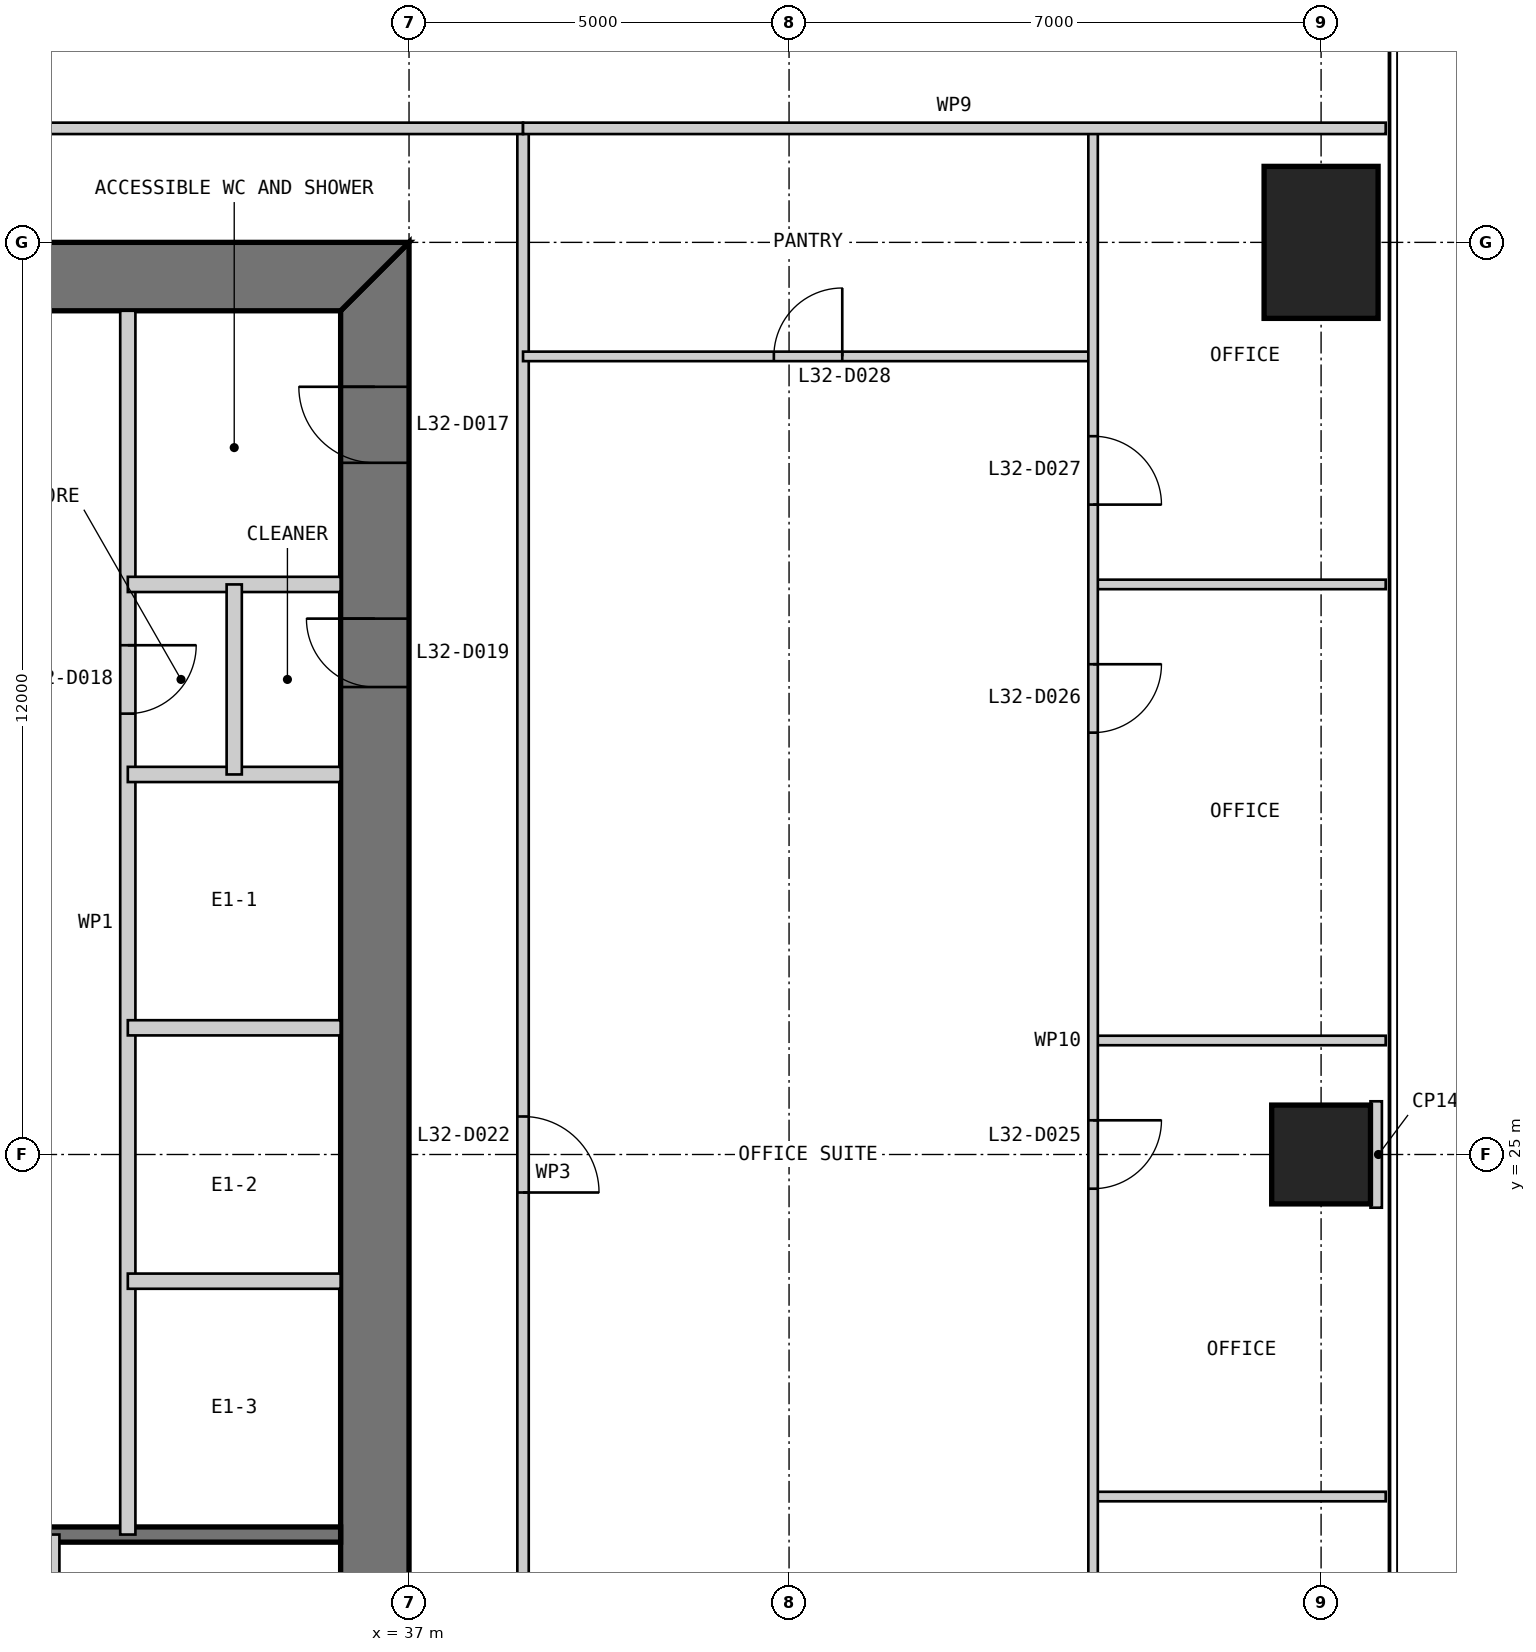
"""IFC4 building model, lengths in metres.
Left out: names, types, materials, properties, quantities, classifications, styles, units other than length and angle.
Written with IfcOpenShell. Run it as: python <this file> out.ifc"""

import sys

from ifc_helpers import new_model, si_unit, direction, frame, frame_2d, origin, origin_2d, place, context, subcontext, project, spatial, polyline, rectangle, outline, extrude, element, fill, save


model = new_model("IFC4")
c1 = context("Model", 3, precision=1e-05, world=origin(), true_north=direction((0.0, 1.0)))
c2 = subcontext(c1, "Body", "Model", "MODEL_VIEW")
j1 = project(units=[si_unit("LENGTHUNIT", "METRE"), si_unit("PLANEANGLEUNIT", "RADIAN")], contexts=[c1])
p1 = place(None, origin())
s1 = spatial("IfcSite", under=j1, at=p1, CompositionType="ELEMENT")
p2 = place(p1, origin())
s2 = spatial("IfcBuilding", under=s1, at=p2, CompositionType="ELEMENT")
p3 = place(p2, frame((0.0, 0.0, 138.4)))
s3 = spatial("IfcBuildingStorey", under=s2, at=p3, CompositionType="ELEMENT", Elevation=138.4)
p4 = place(p3, frame((49.0, 25.0, 0.0), z_axis=(0.0, 0.0, 1.0), x_axis=(1.0, 0.0, 0.0)))
e1 = element("IfcColumn", 1, at=p4, inside=s3, PredefinedType="COLUMN", context=c2, shape_type="SweptSolid", body=[
    extrude(rectangle(XDim=1.3, YDim=1.3, at=origin_2d()), origin(), (0.0, 0.0, 1.0), 4.0),
])
p5 = place(p3, frame((49.0, 37.0, 0.0), z_axis=(0.0, 0.0, 1.0), x_axis=(1.0, 0.0, 0.0)))
e2 = element("IfcColumn", 2, at=p5, inside=s3, PredefinedType="COLUMN", context=c2, shape_type="SweptSolid", body=[
    extrude(rectangle(XDim=1.5, YDim=2.0, at=origin_2d()), origin(), (0.0, 0.0, 1.0), 4.0),
])
p6 = place(p3, frame((36.55, 13.9, 0.0), z_axis=(0.0, 0.0, 1.0), x_axis=(0.0, 1.0, 0.0)))
e3 = element("IfcWall", 3, at=p6, inside=s3, PredefinedType="SHEAR", context=c2, shape_type="SweptSolid", body=[
    extrude(outline(polyline([(-0.9, -0.45), (23.1, -0.45), (22.2, 0.45), (0.0, 0.45), (-0.9, -0.45)])), origin(), (0.0, 0.0, 1.0), 4.0),
])
p7 = place(p6, frame((20.2, 0.0, 0.0)))
e4 = element("IfcOpeningElement", 4, at=p7, cuts=e3, PredefinedType="OPENING", context=c2, shape_type="SweptSolid", body=[
    extrude(rectangle(XDim=1.0, YDim=2.2, at=frame_2d((0.5, 1.1))), frame((0.0, 0.46, 0.0), z_axis=(0.0, -1.0, 0.0), x_axis=(1.0, 0.0, 0.0)), (0.0, 0.0, 1.0), 0.92),
])
p8 = place(p6, frame((17.25, 0.0, 0.0)))
e5 = element("IfcOpeningElement", 5, at=p8, cuts=e3, PredefinedType="OPENING", context=c2, shape_type="SweptSolid", body=[
    extrude(rectangle(XDim=0.9, YDim=2.2, at=frame_2d((0.45, 1.1))), frame((0.0, 0.46, 0.0), z_axis=(0.0, -1.0, 0.0), x_axis=(1.0, 0.0, 0.0)), (0.0, 0.0, 1.0), 0.92),
])
p9 = place(p3, frame((37.0, 36.55, 0.0), z_axis=(0.0, 0.0, 1.0), x_axis=(-1.0, 0.0, 0.0)))
e6 = element("IfcWall", 6, at=p9, inside=s3, PredefinedType="SHEAR", context=c2, shape_type="SweptSolid", body=[
    extrude(outline(polyline([(0.0, -0.45), (24.0, -0.45), (23.1, 0.45), (0.9, 0.45), (0.0, -0.45)])), origin(), (0.0, 0.0, 1.0), 4.0),
])
p10 = place(p9, frame((4.9, 0.0, 0.0)))
e7 = element("IfcOpeningElement", 7, at=p10, cuts=e6, PredefinedType="OPENING", context=c2, shape_type="SweptSolid", body=[
    extrude(rectangle(XDim=1.0, YDim=2.2, at=frame_2d((0.5, 1.1))), frame((0.0, 0.46, 0.0), z_axis=(0.0, -1.0, 0.0), x_axis=(1.0, 0.0, 0.0)), (0.0, 0.0, 1.0), 0.92),
])
p11 = place(p9, frame((8.9, 0.0, 0.0)))
e8 = element("IfcOpeningElement", 8, at=p11, cuts=e6, PredefinedType="OPENING", context=c2, shape_type="SweptSolid", body=[
    extrude(rectangle(XDim=1.1, YDim=2.2, at=frame_2d((0.55, 1.1))), frame((0.0, 0.46, 0.0), z_axis=(0.0, -1.0, 0.0), x_axis=(1.0, 0.0, 0.0)), (0.0, 0.0, 1.0), 0.92),
])
p12 = place(p9, frame((15.05, 0.0, 0.0)))
e9 = element("IfcOpeningElement", 9, at=p12, cuts=e6, PredefinedType="OPENING", context=c2, shape_type="SweptSolid", body=[
    extrude(rectangle(XDim=0.9, YDim=2.2, at=frame_2d((0.45, 1.1))), frame((0.0, 0.46, 0.0), z_axis=(0.0, -1.0, 0.0), x_axis=(1.0, 0.0, 0.0)), (0.0, 0.0, 1.0), 0.92),
])
p13 = place(p9, frame((17.9, 0.0, 0.0)))
e10 = element("IfcOpeningElement", 10, at=p13, cuts=e6, PredefinedType="OPENING", context=c2, shape_type="SweptSolid", body=[
    extrude(rectangle(XDim=1.0, YDim=2.2, at=frame_2d((0.5, 1.1))), frame((0.0, 0.46, 0.0), z_axis=(0.0, -1.0, 0.0), x_axis=(1.0, 0.0, 0.0)), (0.0, 0.0, 1.0), 0.92),
])
p14 = place(p9, frame((21.4, 0.0, 0.0)))
e11 = element("IfcOpeningElement", 11, at=p14, cuts=e6, PredefinedType="OPENING", context=c2, shape_type="SweptSolid", body=[
    extrude(rectangle(XDim=1.0, YDim=2.2, at=frame_2d((0.5, 1.1))), frame((0.0, 0.46, 0.0), z_axis=(0.0, -1.0, 0.0), x_axis=(1.0, 0.0, 0.0)), (0.0, 0.0, 1.0), 0.92),
])
p15 = place(p3, frame((20.3, 20.0, 0.0), z_axis=(0.0, 0.0, 1.0), x_axis=(1.0, 0.0, 0.0)))
e12 = element("IfcWall", 12, at=p15, inside=s3, PredefinedType="SOLIDWALL", context=c2, shape_type="SweptSolid", body=[
    extrude(rectangle(XDim=15.8, YDim=0.2, at=frame_2d((7.9, 0.0))), origin(), (0.0, 0.0, 1.0), 3.8),
])
p16 = place(p3, frame((32.3, 13.9, 0.0), z_axis=(0.0, 0.0, 1.0), x_axis=(0.0, 1.0, 0.0)))
e13 = element("IfcWall", 13, at=p16, inside=s3, PredefinedType="PARTITIONING", context=c2, shape_type="SweptSolid", body=[
    extrude(rectangle(XDim=6.1, YDim=0.2, at=frame_2d((3.05, 0.0))), origin(), (0.0, 0.0, 1.0), 3.8),
])
p17 = place(p3, frame((33.3, 36.1, 0.0), z_axis=(0.0, 0.0, 1.0), x_axis=(0.0, -1.0, 0.0)))
e14 = element("IfcWall", 14, at=p17, inside=s3, PredefinedType="PARTITIONING", context=c2, shape_type="SweptSolid", body=[
    extrude(rectangle(XDim=16.1, YDim=0.2, at=frame_2d((8.05, 0.0))), origin(), (0.0, 0.0, 1.0), 3.8),
])
p18 = place(p17, frame((4.4, 0.0, 0.0)))
e15 = element("IfcOpeningElement", 15, at=p18, cuts=e14, PredefinedType="OPENING", context=c2, shape_type="SweptSolid", body=[
    extrude(rectangle(XDim=0.9, YDim=2.2, at=frame_2d((0.45, 1.1))), frame((0.0, 0.11, 0.0), z_axis=(0.0, -1.0, 0.0), x_axis=(1.0, 0.0, 0.0)), (0.0, 0.0, 1.0), 0.22),
])
for number, where, z_axis, x_axis in (
    (16, (36.1, 30.0, 0.0), (0.0, 0.0, 1.0), (-1.0, 0.0, 0.0)),
    (17, (36.1, 26.667, 0.0), (0.0, 0.0, 1.0), (-1.0, 0.0, 0.0)),
    (18, (36.1, 23.333, 0.0), (0.0, 0.0, 1.0), (-1.0, 0.0, 0.0)),
    (19, (36.1, 32.5, 0.0), (0.0, 0.0, 1.0), (-1.0, 0.0, 0.0)),
):
    element("IfcWall", number, at=place(p3, frame(where, z_axis=z_axis, x_axis=x_axis)), inside=s3, PredefinedType="PARTITIONING", context=c2, shape_type="SweptSolid", body=[
        extrude(rectangle(XDim=2.8, YDim=0.2, at=frame_2d((1.4, 0.0))), origin(), (0.0, 0.0, 1.0), 3.8),
    ])
p19 = place(p3, frame((34.7, 32.5, 0.0), z_axis=(0.0, 0.0, 1.0), x_axis=(0.0, -1.0, 0.0)))
e20 = element("IfcWall", 20, at=p19, inside=s3, PredefinedType="PARTITIONING", context=c2, shape_type="SweptSolid", body=[
    extrude(rectangle(XDim=2.5, YDim=0.2, at=frame_2d((1.25, 0.0))), origin(), (0.0, 0.0, 1.0), 3.8),
])
p20 = place(p3, frame((38.5, 11.5, 0.0), z_axis=(0.0, 0.0, 1.0), x_axis=(0.0, 1.0, 0.0)))
e21 = element("IfcWall", 21, at=p20, inside=s3, PredefinedType="PARTITIONING", context=c2, shape_type="SweptSolid", body=[
    extrude(rectangle(XDim=27.0, YDim=0.15, at=frame_2d((13.5, 0.0))), origin(), (0.0, 0.0, 1.0), 3.85),
])
p21 = place(p20, frame((13.0, 0.0, 0.0)))
e22 = element("IfcOpeningElement", 22, at=p21, cuts=e21, PredefinedType="OPENING", context=c2, shape_type="SweptSolid", body=[
    extrude(rectangle(XDim=1.0, YDim=2.2, at=frame_2d((0.5, 1.1))), frame((0.0, 0.085, 0.0), z_axis=(0.0, -1.0, 0.0), x_axis=(1.0, 0.0, 0.0)), (0.0, 0.0, 1.0), 0.17),
])
for number, where, z_axis, x_axis in (
    (23, (49.85, 20.5, 0.0), (0.0, 0.0, 1.0), (-1.0, 0.0, 0.0)),
    (24, (49.85, 26.5, 0.0), (0.0, 0.0, 1.0), (-1.0, 0.0, 0.0)),
    (25, (49.85, 32.5, 0.0), (0.0, 0.0, 1.0), (-1.0, 0.0, 0.0)),
):
    element("IfcWall", number, at=place(p3, frame(where, z_axis=z_axis, x_axis=x_axis)), inside=s3, PredefinedType="PARTITIONING", context=c2, shape_type="SweptSolid", body=[
        extrude(rectangle(XDim=3.85, YDim=0.125, at=frame_2d((1.925, 0.0))), origin(), (0.0, 0.0, 1.0), 3.85),
    ])
p22 = place(p3, frame((46.0, 35.5, 0.0), z_axis=(0.0, 0.0, 1.0), x_axis=(-1.0, 0.0, 0.0)))
e26 = element("IfcWall", 26, at=p22, inside=s3, PredefinedType="PARTITIONING", context=c2, shape_type="SweptSolid", body=[
    extrude(rectangle(XDim=7.5, YDim=0.125, at=frame_2d((3.75, 0.0))), origin(), (0.0, 0.0, 1.0), 3.85),
])
p23 = place(p22, frame((3.3, 0.0, 0.0)))
e27 = element("IfcOpeningElement", 27, at=p23, cuts=e26, PredefinedType="OPENING", context=c2, shape_type="SweptSolid", body=[
    extrude(rectangle(XDim=0.9, YDim=2.2, at=frame_2d((0.45, 1.1))), frame((0.0, 0.073, 0.0), z_axis=(0.0, -1.0, 0.0), x_axis=(1.0, 0.0, 0.0)), (0.0, 0.0, 1.0), 0.145),
])
p24 = place(p3, frame((46.0, 14.5, 0.0), z_axis=(0.0, 0.0, 1.0), x_axis=(0.0, 1.0, 0.0)))
e28 = element("IfcWall", 28, at=p24, inside=s3, PredefinedType="PARTITIONING", context=c2, shape_type="SweptSolid", body=[
    extrude(rectangle(XDim=24.0, YDim=0.125, at=frame_2d((12.0, 0.0))), origin(), (0.0, 0.0, 1.0), 3.238),
])
p25 = place(p24, frame((4.05, 0.0, 0.0)))
e29 = element("IfcOpeningElement", 29, at=p25, cuts=e28, PredefinedType="OPENING", context=c2, shape_type="SweptSolid", body=[
    extrude(rectangle(XDim=0.9, YDim=2.2, at=frame_2d((0.45, 1.1))), frame((0.0, 0.073, 0.0), z_axis=(0.0, -1.0, 0.0), x_axis=(1.0, 0.0, 0.0)), (0.0, 0.0, 1.0), 0.145),
])
p26 = place(p24, frame((10.05, 0.0, 0.0)))
e30 = element("IfcOpeningElement", 30, at=p26, cuts=e28, PredefinedType="OPENING", context=c2, shape_type="SweptSolid", body=[
    extrude(rectangle(XDim=0.9, YDim=2.2, at=frame_2d((0.45, 1.1))), frame((0.0, 0.073, 0.0), z_axis=(0.0, -1.0, 0.0), x_axis=(1.0, 0.0, 0.0)), (0.0, 0.0, 1.0), 0.145),
])
p27 = place(p24, frame((16.05, 0.0, 0.0)))
e31 = element("IfcOpeningElement", 31, at=p27, cuts=e28, PredefinedType="OPENING", context=c2, shape_type="SweptSolid", body=[
    extrude(rectangle(XDim=0.9, YDim=2.2, at=frame_2d((0.45, 1.1))), frame((0.0, 0.073, 0.0), z_axis=(0.0, -1.0, 0.0), x_axis=(1.0, 0.0, 0.0)), (0.0, 0.0, 1.0), 0.145),
])
p28 = place(p24, frame((19.05, 0.0, 0.0)))
e32 = element("IfcOpeningElement", 32, at=p28, cuts=e28, PredefinedType="OPENING", context=c2, shape_type="SweptSolid", body=[
    extrude(rectangle(XDim=0.9, YDim=2.2, at=frame_2d((0.45, 1.1))), frame((0.0, 0.073, 0.0), z_axis=(0.0, -1.0, 0.0), x_axis=(1.0, 0.0, 0.0)), (0.0, 0.0, 1.0), 0.145),
])
p29 = place(p3, frame((38.5, 38.5, 0.0), z_axis=(0.0, 0.0, 1.0), x_axis=(-1.0, 0.0, 0.0)))
e33 = element("IfcWall", 33, at=p29, inside=s3, PredefinedType="PARTITIONING", context=c2, shape_type="SweptSolid", body=[
    extrude(rectangle(XDim=27.0, YDim=0.15, at=frame_2d((13.5, 0.0))), origin(), (0.0, 0.0, 1.0), 3.85),
])
p30 = place(p29, frame((11.5, 0.0, 0.0)))
e34 = element("IfcOpeningElement", 34, at=p30, cuts=e33, PredefinedType="OPENING", context=c2, shape_type="SweptSolid", body=[
    extrude(rectangle(XDim=1.0, YDim=2.2, at=frame_2d((0.5, 1.1))), frame((0.0, 0.085, 0.0), z_axis=(0.0, -1.0, 0.0), x_axis=(1.0, 0.0, 0.0)), (0.0, 0.0, 1.0), 0.17),
])
p31 = place(p3, frame((49.85, 38.5, 0.0), z_axis=(0.0, 0.0, 1.0), x_axis=(-1.0, 0.0, 0.0)))
e35 = element("IfcWall", 35, at=p31, inside=s3, PredefinedType="PARTITIONING", context=c2, shape_type="SweptSolid", body=[
    extrude(rectangle(XDim=11.35, YDim=0.15, at=frame_2d((5.675, 0.0))), origin(), (0.0, 0.0, 1.0), 3.85),
])
p32 = place(p3, frame((49.8, 25.0, 0.0), z_axis=(0.0, 0.0, 1.0), x_axis=(-1.0, 0.0, 0.0)))
e36 = element("IfcWall", 36, at=p32, inside=s3, PredefinedType="PARTITIONING", context=c2, shape_type="SweptSolid", body=[
    extrude(rectangle(XDim=0.15, YDim=1.4, at=frame_2d((0.075, 0.0))), origin(), (0.0, 0.0, 1.0), 3.85),
])
p33 = place(p7, origin())
e37 = element("IfcDoor", 37, at=p33, inside=s3, OperationType="SINGLE_SWING_RIGHT", PredefinedType="DOOR", context=c2, shape_type="SweptSolid", body=[
    extrude(rectangle(XDim=1.0, YDim=2.2, at=frame_2d((0.5, 1.1))), frame((0.0, 0.025, 0.0), z_axis=(0.0, -1.0, 0.0), x_axis=(1.0, 0.0, 0.0)), (0.0, 0.0, 1.0), 0.05),
    extrude(outline(polyline([(0.0, 0.0), (0.04, 0.0), (0.04, 2.16), (0.96, 2.16), (0.96, 0.0), (1.0, 0.0), (1.0, 2.2), (0.0, 2.2), (0.0, 0.0)])), frame((0.0, 0.3, 0.0), z_axis=(0.0, -1.0, 0.0), x_axis=(1.0, 0.0, 0.0)), (0.0, 0.0, 1.0), 0.6),
])
fill(e4, e37)
p34 = place(p18, origin())
e38 = element("IfcDoor", 38, at=p34, inside=s3, OperationType="SINGLE_SWING_LEFT", PredefinedType="DOOR", context=c2, shape_type="SweptSolid", body=[
    extrude(rectangle(XDim=0.9, YDim=2.2, at=frame_2d((0.45, 1.1))), frame((0.0, 0.025, 0.0), z_axis=(0.0, -1.0, 0.0), x_axis=(1.0, 0.0, 0.0)), (0.0, 0.0, 1.0), 0.05),
])
fill(e15, e38)
p35 = place(p8, origin())
e39 = element("IfcDoor", 39, at=p35, inside=s3, OperationType="SINGLE_SWING_RIGHT", PredefinedType="DOOR", context=c2, shape_type="SweptSolid", body=[
    extrude(rectangle(XDim=0.9, YDim=2.2, at=frame_2d((0.45, 1.1))), frame((0.0, 0.025, 0.0), z_axis=(0.0, -1.0, 0.0), x_axis=(1.0, 0.0, 0.0)), (0.0, 0.0, 1.0), 0.05),
    extrude(outline(polyline([(0.0, 0.0), (0.04, 0.0), (0.04, 2.16), (0.86, 2.16), (0.86, 0.0), (0.9, 0.0), (0.9, 2.2), (0.0, 2.2), (0.0, 0.0)])), frame((0.0, 0.3, 0.0), z_axis=(0.0, -1.0, 0.0), x_axis=(1.0, 0.0, 0.0)), (0.0, 0.0, 1.0), 0.6),
])
fill(e5, e39)
p36 = place(p21, frame((1.0, 0.0, 0.0), z_axis=(0.0, 0.0, 1.0), x_axis=(-1.0, 0.0, 0.0)))
e40 = element("IfcDoor", 40, at=p36, inside=s3, OperationType="SINGLE_SWING_RIGHT", PredefinedType="DOOR", context=c2, shape_type="SweptSolid", body=[
    extrude(rectangle(XDim=1.0, YDim=2.2, at=frame_2d((0.5, 1.1))), frame((0.0, 0.025, 0.0), z_axis=(0.0, -1.0, 0.0), x_axis=(1.0, 0.0, 0.0)), (0.0, 0.0, 1.0), 0.05),
])
fill(e22, e40)
p37 = place(p26, frame((0.9, 0.0, 0.0), z_axis=(0.0, 0.0, 1.0), x_axis=(-1.0, 0.0, 0.0)))
e41 = element("IfcDoor", 41, at=p37, inside=s3, OperationType="SINGLE_SWING_LEFT", PredefinedType="DOOR", context=c2, shape_type="SweptSolid", body=[
    extrude(rectangle(XDim=0.9, YDim=2.2, at=frame_2d((0.45, 1.1))), frame((0.0, 0.025, 0.0), z_axis=(0.0, -1.0, 0.0), x_axis=(1.0, 0.0, 0.0)), (0.0, 0.0, 1.0), 0.05),
])
fill(e30, e41)
p38 = place(p27, frame((0.9, 0.0, 0.0), z_axis=(0.0, 0.0, 1.0), x_axis=(-1.0, 0.0, 0.0)))
e42 = element("IfcDoor", 42, at=p38, inside=s3, OperationType="SINGLE_SWING_LEFT", PredefinedType="DOOR", context=c2, shape_type="SweptSolid", body=[
    extrude(rectangle(XDim=0.9, YDim=2.2, at=frame_2d((0.45, 1.1))), frame((0.0, 0.025, 0.0), z_axis=(0.0, -1.0, 0.0), x_axis=(1.0, 0.0, 0.0)), (0.0, 0.0, 1.0), 0.05),
])
fill(e31, e42)
p39 = place(p28, frame((0.9, 0.0, 0.0), z_axis=(0.0, 0.0, 1.0), x_axis=(-1.0, 0.0, 0.0)))
e43 = element("IfcDoor", 43, at=p39, inside=s3, OperationType="SINGLE_SWING_RIGHT", PredefinedType="DOOR", context=c2, shape_type="SweptSolid", body=[
    extrude(rectangle(XDim=0.9, YDim=2.2, at=frame_2d((0.45, 1.1))), frame((0.0, 0.025, 0.0), z_axis=(0.0, -1.0, 0.0), x_axis=(1.0, 0.0, 0.0)), (0.0, 0.0, 1.0), 0.05),
])
fill(e32, e43)
p40 = place(p23, frame((0.9, 0.0, 0.0), z_axis=(0.0, 0.0, 1.0), x_axis=(-1.0, 0.0, 0.0)))
e44 = element("IfcDoor", 44, at=p40, inside=s3, OperationType="SINGLE_SWING_RIGHT", PredefinedType="DOOR", context=c2, shape_type="SweptSolid", body=[
    extrude(rectangle(XDim=0.9, YDim=2.2, at=frame_2d((0.45, 1.1))), frame((0.0, 0.025, 0.0), z_axis=(0.0, -1.0, 0.0), x_axis=(1.0, 0.0, 0.0)), (0.0, 0.0, 1.0), 0.05),
])
fill(e27, e44)
save(model, sys.argv[1])
